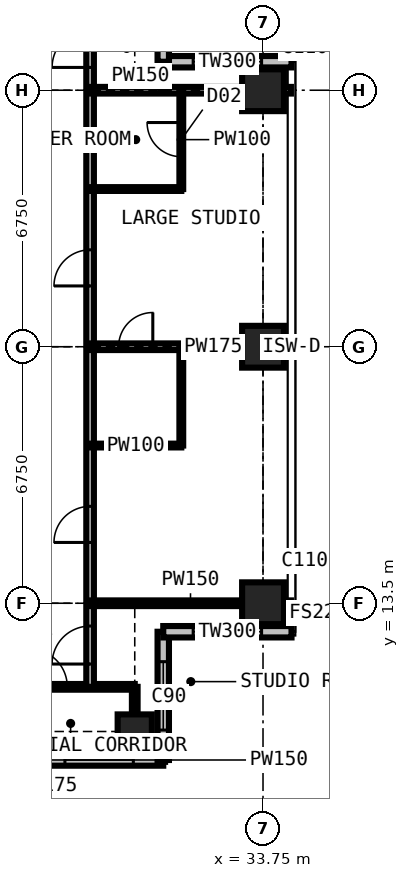
"""IFC4 building model, lengths in metres.
Left out: names, types, materials, properties, quantities, classifications, styles, units other than length and angle.
Written with IfcOpenShell. Run it as: python <this file> out.ifc"""

import sys

from ifc_helpers import new_model, si_unit, direction, frame, frame_2d, origin, origin_2d, place, context, subcontext, project, spatial, rectangle, extrude, element, fill, save


model = new_model("IFC4")
c1 = context("Model", 3, precision=1e-05, world=origin(), true_north=direction((0.0, 1.0)))
c2 = subcontext(c1, "Body", "Model", "MODEL_VIEW")
j1 = project(units=[si_unit("LENGTHUNIT", "METRE"), si_unit("PLANEANGLEUNIT", "RADIAN")], contexts=[c1])
p1 = place(None, origin())
s1 = spatial("IfcSite", under=j1, at=p1, CompositionType="ELEMENT")
p2 = place(p1, origin())
s2 = spatial("IfcBuilding", under=s1, at=p2, CompositionType="ELEMENT")
p3 = place(p2, frame((0.0, 0.0, 222.3)))
s3 = spatial("IfcBuildingStorey", under=s2, at=p3, CompositionType="ELEMENT", Elevation=222.3)
p4 = place(p3, frame((30.375, 10.125, 0.0), z_axis=(0.0, 0.0, 1.0), x_axis=(1.0, 0.0, 0.0)))
e1 = element("IfcColumn", 1, at=p4, inside=s3, PredefinedType="COLUMN", context=c2, shape_type="SweptSolid", body=[
    extrude(rectangle(XDim=0.9, YDim=0.9, at=origin_2d()), origin(), (0.0, 0.0, 1.0), 3.6),
])
for number, where, z_axis, x_axis in (
    (2, (33.75, 13.5, 0.0), (0.0, 0.0, 1.0), (1.0, 0.0, 0.0)),
    (3, (33.75, 20.25, 0.0), (0.0, 0.0, 1.0), (1.0, 0.0, 0.0)),
    (4, (33.75, 27.0, 0.0), (0.0, 0.0, 1.0), (1.0, 0.0, 0.0)),
):
    element("IfcColumn", number, at=place(p3, frame(where, z_axis=z_axis, x_axis=x_axis)), inside=s3, PredefinedType="COLUMN", context=c2, shape_type="SweptSolid", body=[
        extrude(rectangle(XDim=1.1, YDim=1.1, at=origin_2d()), origin(), (0.0, 0.0, 1.0), 3.6),
    ])
p5 = place(p3, frame((34.5, 27.75, 0.0), z_axis=(0.0, 0.0, 1.0), x_axis=(-1.0, 0.0, 0.0)))
e5 = element("IfcWall", 5, at=p5, inside=s3, PredefinedType="SOLIDWALL", context=c2, shape_type="SweptSolid", body=[
    extrude(rectangle(XDim=3.375, YDim=0.3, at=frame_2d((1.688, 0.0))), origin(), (0.0, 0.0, 1.0), 3.375),
])
p6 = place(p5, frame((0.788, 0.0, 0.6)))
e6 = element("IfcOpeningElement", 6, at=p6, cuts=e5, PredefinedType="OPENING", context=c2, shape_type="SweptSolid", body=[
    extrude(rectangle(XDim=1.8, YDim=2.1, at=frame_2d((0.9, 1.05))), frame((0.0, 0.16, 0.0), z_axis=(0.0, -1.0, 0.0), x_axis=(1.0, 0.0, 0.0)), (0.0, 0.0, 1.0), 0.32),
])
p7 = place(p3, frame((31.125, 27.75, 0.0), z_axis=(0.0, 0.0, 1.0), x_axis=(0.0, 1.0, 0.0)))
e7 = element("IfcWall", 7, at=p7, inside=s3, PredefinedType="SOLIDWALL", context=c2, shape_type="SweptSolid", body=[
    extrude(rectangle(XDim=3.375, YDim=0.3, at=frame_2d((1.688, 0.0))), origin(), (0.0, 0.0, 1.0), 3.375),
])
p8 = place(p7, frame((1.663, 0.0, 0.9)))
e8 = element("IfcOpeningElement", 8, at=p8, cuts=e7, PredefinedType="OPENING", context=c2, shape_type="SweptSolid", body=[
    extrude(rectangle(XDim=1.5, YDim=1.8, at=frame_2d((0.75, 0.9))), frame((0.0, 0.16, 0.0), z_axis=(0.0, -1.0, 0.0), x_axis=(1.0, 0.0, 0.0)), (0.0, 0.0, 1.0), 0.32),
])
p9 = place(p3, frame((27.75, 9.375, 0.0), z_axis=(0.0, 0.0, 1.0), x_axis=(1.0, 0.0, 0.0)))
e9 = element("IfcWall", 9, at=p9, inside=s3, PredefinedType="SOLIDWALL", context=c2, shape_type="SweptSolid", body=[
    extrude(rectangle(XDim=3.375, YDim=0.3, at=frame_2d((1.688, 0.0))), origin(), (0.0, 0.0, 1.0), 3.375),
])
p10 = place(p9, frame((0.788, 0.0, 0.6)))
e10 = element("IfcOpeningElement", 10, at=p10, cuts=e9, PredefinedType="OPENING", context=c2, shape_type="SweptSolid", body=[
    extrude(rectangle(XDim=1.8, YDim=2.1, at=frame_2d((0.9, 1.05))), frame((0.0, 0.16, 0.0), z_axis=(0.0, -1.0, 0.0), x_axis=(1.0, 0.0, 0.0)), (0.0, 0.0, 1.0), 0.32),
])
p11 = place(p3, frame((31.125, 9.375, 0.0), z_axis=(0.0, 0.0, 1.0), x_axis=(0.0, 1.0, 0.0)))
e11 = element("IfcWall", 11, at=p11, inside=s3, PredefinedType="SOLIDWALL", context=c2, shape_type="SweptSolid", body=[
    extrude(rectangle(XDim=3.375, YDim=0.3, at=frame_2d((1.688, 0.0))), origin(), (0.0, 0.0, 1.0), 3.375),
])
p12 = place(p11, frame((0.788, 0.0, 0.6)))
e12 = element("IfcOpeningElement", 12, at=p12, cuts=e11, PredefinedType="OPENING", context=c2, shape_type="SweptSolid", body=[
    extrude(rectangle(XDim=1.8, YDim=2.1, at=frame_2d((0.9, 1.05))), frame((0.0, 0.16, 0.0), z_axis=(0.0, -1.0, 0.0), x_axis=(1.0, 0.0, 0.0)), (0.0, 0.0, 1.0), 0.32),
])
p13 = place(p3, frame((31.125, 12.75, 0.0), z_axis=(0.0, 0.0, 1.0), x_axis=(1.0, 0.0, 0.0)))
e13 = element("IfcWall", 13, at=p13, inside=s3, PredefinedType="SOLIDWALL", context=c2, shape_type="SweptSolid", body=[
    extrude(rectangle(XDim=3.375, YDim=0.3, at=frame_2d((1.688, 0.0))), origin(), (0.0, 0.0, 1.0), 3.375),
])
p14 = place(p13, frame((0.788, 0.0, 0.6)))
e14 = element("IfcOpeningElement", 14, at=p14, cuts=e13, PredefinedType="OPENING", context=c2, shape_type="SweptSolid", body=[
    extrude(rectangle(XDim=1.8, YDim=2.1, at=frame_2d((0.9, 1.05))), frame((0.0, 0.16, 0.0), z_axis=(0.0, -1.0, 0.0), x_axis=(1.0, 0.0, 0.0)), (0.0, 0.0, 1.0), 0.32),
])
p15 = place(p3, frame((27.0, 11.3, 0.0), z_axis=(0.0, 0.0, 1.0), x_axis=(1.0, 0.0, 0.0)))
e15 = element("IfcWall", 15, at=p15, inside=s3, PredefinedType="PARTITIONING", context=c2, shape_type="SweptSolid", body=[
    extrude(rectangle(XDim=3.375, YDim=0.15, at=frame_2d((1.688, 0.0))), origin(), (0.0, 0.0, 1.0), 3.375),
])
p16 = place(p15, frame((0.6, 0.0, 0.0)))
e16 = element("IfcOpeningElement", 16, at=p16, cuts=e15, PredefinedType="OPENING", context=c2, shape_type="SweptSolid", body=[
    extrude(rectangle(XDim=1.0, YDim=2.2, at=frame_2d((0.5, 1.1))), frame((0.0, 0.085, 0.0), z_axis=(0.0, -1.0, 0.0), x_axis=(1.0, 0.0, 0.0)), (0.0, 0.0, 1.0), 0.17),
])
p17 = place(p3, frame((29.2, 11.3, 0.0), z_axis=(0.0, 0.0, 1.0), x_axis=(0.0, 1.0, 0.0)))
e17 = element("IfcWall", 17, at=p17, inside=s3, PredefinedType="PARTITIONING", context=c2, shape_type="SweptSolid", body=[
    extrude(rectangle(XDim=17.9, YDim=0.2, at=frame_2d((8.95, 0.0))), origin(), (0.0, 0.0, 1.0), 3.375),
])
p18 = place(p17, frame((0.6, 0.0, 0.0)))
e18 = element("IfcOpeningElement", 18, at=p18, cuts=e17, PredefinedType="OPENING", context=c2, shape_type="SweptSolid", body=[
    extrude(rectangle(XDim=1.0, YDim=2.2, at=frame_2d((0.5, 1.1))), frame((0.0, 0.11, 0.0), z_axis=(0.0, -1.0, 0.0), x_axis=(1.0, 0.0, 0.0)), (0.0, 0.0, 1.0), 0.22),
])
p19 = place(p17, frame((10.55, 0.0, 0.0)))
e19 = element("IfcOpeningElement", 19, at=p19, cuts=e17, PredefinedType="OPENING", context=c2, shape_type="SweptSolid", body=[
    extrude(rectangle(XDim=0.95, YDim=2.2, at=frame_2d((0.475, 1.1))), frame((0.0, 0.11, 0.0), z_axis=(0.0, -1.0, 0.0), x_axis=(1.0, 0.0, 0.0)), (0.0, 0.0, 1.0), 0.22),
])
p20 = place(p17, frame((3.8, 0.0, 0.0)))
e20 = element("IfcOpeningElement", 20, at=p20, cuts=e17, PredefinedType="OPENING", context=c2, shape_type="SweptSolid", body=[
    extrude(rectangle(XDim=0.95, YDim=2.2, at=frame_2d((0.475, 1.1))), frame((0.0, 0.11, 0.0), z_axis=(0.0, -1.0, 0.0), x_axis=(1.0, 0.0, 0.0)), (0.0, 0.0, 1.0), 0.22),
])
p21 = place(p17, frame((16.3, 0.0, 0.0)))
e21 = element("IfcOpeningElement", 21, at=p21, cuts=e17, PredefinedType="OPENING", context=c2, shape_type="SweptSolid", body=[
    extrude(rectangle(XDim=1.0, YDim=2.2, at=frame_2d((0.5, 1.1))), frame((0.0, 0.11, 0.0), z_axis=(0.0, -1.0, 0.0), x_axis=(1.0, 0.0, 0.0)), (0.0, 0.0, 1.0), 0.22),
])
p22 = place(p3, frame((29.2, 13.5, 0.0), z_axis=(0.0, 0.0, 1.0), x_axis=(1.0, 0.0, 0.0)))
e22 = element("IfcWall", 22, at=p22, inside=s3, PredefinedType="PARTITIONING", context=c2, shape_type="SweptSolid", body=[
    extrude(rectangle(XDim=5.284, YDim=0.15, at=frame_2d((2.642, 0.0))), origin(), (0.0, 0.0, 1.0), 2.877),
])
p23 = place(p3, frame((29.2, 17.65, 0.0), z_axis=(0.0, 0.0, 1.0), x_axis=(1.0, 0.0, 0.0)))
e23 = element("IfcWall", 23, at=p23, inside=s3, PredefinedType="PARTITIONING", context=c2, shape_type="SweptSolid", body=[
    extrude(rectangle(XDim=2.4, YDim=0.1, at=frame_2d((1.2, 0.0))), origin(), (0.0, 0.0, 1.0), 3.375),
])
p24 = place(p3, frame((29.2, 20.25, 0.0), z_axis=(0.0, 0.0, 1.0), x_axis=(1.0, 0.0, 0.0)))
e24 = element("IfcWall", 24, at=p24, inside=s3, PredefinedType="PARTITIONING", context=c2, shape_type="SweptSolid", body=[
    extrude(rectangle(XDim=5.284, YDim=0.175, at=frame_2d((2.642, 0.0))), origin(), (0.0, 0.0, 1.0), 2.877),
])
p25 = place(p24, frame((0.75, 0.0, 0.0)))
e25 = element("IfcOpeningElement", 25, at=p25, cuts=e24, PredefinedType="OPENING", context=c2, shape_type="SweptSolid", body=[
    extrude(rectangle(XDim=0.9, YDim=2.2, at=frame_2d((0.45, 1.1))), frame((0.0, 0.097, 0.0), z_axis=(0.0, -1.0, 0.0), x_axis=(1.0, 0.0, 0.0)), (0.0, 0.0, 1.0), 0.195),
])
p26 = place(p3, frame((29.2, 24.4, 0.0), z_axis=(0.0, 0.0, 1.0), x_axis=(1.0, 0.0, 0.0)))
e26 = element("IfcWall", 26, at=p26, inside=s3, PredefinedType="PARTITIONING", context=c2, shape_type="SweptSolid", body=[
    extrude(rectangle(XDim=2.4, YDim=0.1, at=frame_2d((1.2, 0.0))), origin(), (0.0, 0.0, 1.0), 3.375),
])
p27 = place(p3, frame((29.2, 27.0, 0.0), z_axis=(0.0, 0.0, 1.0), x_axis=(1.0, 0.0, 0.0)))
e27 = element("IfcWall", 27, at=p27, inside=s3, PredefinedType="PARTITIONING", context=c2, shape_type="SweptSolid", body=[
    extrude(rectangle(XDim=5.284, YDim=0.175, at=frame_2d((2.642, 0.0))), origin(), (0.0, 0.0, 1.0), 2.877),
])
p28 = place(p3, frame((30.375, 9.525, 0.0), z_axis=(0.0, 0.0, 1.0), x_axis=(0.0, 1.0, 0.0)))
e28 = element("IfcWall", 28, at=p28, inside=s3, PredefinedType="PARTITIONING", context=c2, shape_type="SweptSolid", body=[
    extrude(rectangle(XDim=1.775, YDim=0.15, at=frame_2d((0.888, 0.0))), origin(), (0.0, 0.0, 1.0), 2.877),
])
p29 = place(p3, frame((31.125, 27.0, 0.0), z_axis=(0.0, 0.0, 1.0), x_axis=(0.0, 1.0, 0.0)))
e29 = element("IfcWall", 29, at=p29, inside=s3, PredefinedType="PARTITIONING", context=c2, shape_type="SweptSolid", body=[
    extrude(rectangle(XDim=0.734, YDim=0.15, at=frame_2d((0.367, 0.0))), origin(), (0.0, 0.0, 1.0), 3.375),
])
p30 = place(p3, frame((31.6, 17.65, 0.0), z_axis=(0.0, 0.0, 1.0), x_axis=(0.0, 1.0, 0.0)))
e30 = element("IfcWall", 30, at=p30, inside=s3, PredefinedType="PARTITIONING", context=c2, shape_type="SweptSolid", body=[
    extrude(rectangle(XDim=2.6, YDim=0.1, at=frame_2d((1.3, 0.0))), origin(), (0.0, 0.0, 1.0), 3.375),
])
p31 = place(p3, frame((31.6, 24.4, 0.0), z_axis=(0.0, 0.0, 1.0), x_axis=(0.0, 1.0, 0.0)))
e31 = element("IfcWall", 31, at=p31, inside=s3, PredefinedType="PARTITIONING", context=c2, shape_type="SweptSolid", body=[
    extrude(rectangle(XDim=2.6, YDim=0.1, at=frame_2d((1.3, 0.0))), origin(), (0.0, 0.0, 1.0), 3.375),
])
p32 = place(p31, frame((0.85, 0.0, 0.0)))
e32 = element("IfcOpeningElement", 32, at=p32, cuts=e31, PredefinedType="OPENING", context=c2, shape_type="SweptSolid", body=[
    extrude(rectangle(XDim=0.9, YDim=2.2, at=frame_2d((0.45, 1.1))), frame((0.0, 0.06, 0.0), z_axis=(0.0, -1.0, 0.0), x_axis=(1.0, 0.0, 0.0)), (0.0, 0.0, 1.0), 0.12),
])
p33 = place(p6, origin())
e33 = element("IfcWindow", 33, at=p33, inside=s3, PartitioningType="SINGLE_PANEL", PredefinedType="WINDOW", context=c2, shape_type="SweptSolid", body=[
    extrude(rectangle(XDim=1.8, YDim=2.1, at=frame_2d((0.9, 1.05))), frame((0.0, 0.03, 0.0), z_axis=(0.0, -1.0, 0.0), x_axis=(1.0, 0.0, 0.0)), (0.0, 0.0, 1.0), 0.06),
])
fill(e6, e33)
p34 = place(p10, origin())
e34 = element("IfcWindow", 34, at=p34, inside=s3, PartitioningType="SINGLE_PANEL", PredefinedType="WINDOW", context=c2, shape_type="SweptSolid", body=[
    extrude(rectangle(XDim=1.8, YDim=2.1, at=frame_2d((0.9, 1.05))), frame((0.0, 0.03, 0.0), z_axis=(0.0, -1.0, 0.0), x_axis=(1.0, 0.0, 0.0)), (0.0, 0.0, 1.0), 0.06),
])
fill(e10, e34)
p35 = place(p12, origin())
e35 = element("IfcWindow", 35, at=p35, inside=s3, PartitioningType="SINGLE_PANEL", PredefinedType="WINDOW", context=c2, shape_type="SweptSolid", body=[
    extrude(rectangle(XDim=1.8, YDim=2.1, at=frame_2d((0.9, 1.05))), frame((0.0, 0.03, 0.0), z_axis=(0.0, -1.0, 0.0), x_axis=(1.0, 0.0, 0.0)), (0.0, 0.0, 1.0), 0.06),
])
fill(e12, e35)
p36 = place(p14, origin())
e36 = element("IfcWindow", 36, at=p36, inside=s3, PartitioningType="SINGLE_PANEL", PredefinedType="WINDOW", context=c2, shape_type="SweptSolid", body=[
    extrude(rectangle(XDim=1.8, YDim=2.1, at=frame_2d((0.9, 1.05))), frame((0.0, 0.03, 0.0), z_axis=(0.0, -1.0, 0.0), x_axis=(1.0, 0.0, 0.0)), (0.0, 0.0, 1.0), 0.06),
])
fill(e14, e36)
p37 = place(p16, origin())
e37 = element("IfcDoor", 37, at=p37, inside=s3, OperationType="SINGLE_SWING_LEFT", PredefinedType="DOOR", context=c2, shape_type="SweptSolid", body=[
    extrude(rectangle(XDim=1.0, YDim=2.2, at=frame_2d((0.5, 1.1))), frame((0.0, 0.025, 0.0), z_axis=(0.0, -1.0, 0.0), x_axis=(1.0, 0.0, 0.0)), (0.0, 0.0, 1.0), 0.05),
])
fill(e16, e37)
p38 = place(p18, origin())
e38 = element("IfcDoor", 38, at=p38, inside=s3, OperationType="SINGLE_SWING_LEFT", PredefinedType="DOOR", context=c2, shape_type="SweptSolid", body=[
    extrude(rectangle(XDim=1.0, YDim=2.2, at=frame_2d((0.5, 1.1))), frame((0.0, 0.025, 0.0), z_axis=(0.0, -1.0, 0.0), x_axis=(1.0, 0.0, 0.0)), (0.0, 0.0, 1.0), 0.05),
])
fill(e18, e38)
p39 = place(p19, origin())
e39 = element("IfcDoor", 39, at=p39, inside=s3, OperationType="SINGLE_SWING_LEFT", PredefinedType="DOOR", context=c2, shape_type="SweptSolid", body=[
    extrude(rectangle(XDim=0.95, YDim=2.2, at=frame_2d((0.475, 1.1))), frame((0.0, 0.025, 0.0), z_axis=(0.0, -1.0, 0.0), x_axis=(1.0, 0.0, 0.0)), (0.0, 0.0, 1.0), 0.05),
])
fill(e19, e39)
p40 = place(p32, origin())
e40 = element("IfcDoor", 40, at=p40, inside=s3, OperationType="SINGLE_SWING_RIGHT", PredefinedType="DOOR", context=c2, shape_type="SweptSolid", body=[
    extrude(rectangle(XDim=0.9, YDim=2.2, at=frame_2d((0.45, 1.1))), frame((0.0, 0.025, 0.0), z_axis=(0.0, -1.0, 0.0), x_axis=(1.0, 0.0, 0.0)), (0.0, 0.0, 1.0), 0.05),
])
fill(e32, e40)
p41 = place(p20, origin())
e41 = element("IfcDoor", 41, at=p41, inside=s3, OperationType="SINGLE_SWING_LEFT", PredefinedType="DOOR", context=c2, shape_type="SweptSolid", body=[
    extrude(rectangle(XDim=0.95, YDim=2.2, at=frame_2d((0.475, 1.1))), frame((0.0, 0.025, 0.0), z_axis=(0.0, -1.0, 0.0), x_axis=(1.0, 0.0, 0.0)), (0.0, 0.0, 1.0), 0.05),
])
fill(e20, e41)
p42 = place(p25, origin())
e42 = element("IfcDoor", 42, at=p42, inside=s3, OperationType="SINGLE_SWING_RIGHT", PredefinedType="DOOR", context=c2, shape_type="SweptSolid", body=[
    extrude(rectangle(XDim=0.9, YDim=2.2, at=frame_2d((0.45, 1.1))), frame((0.0, 0.025, 0.0), z_axis=(0.0, -1.0, 0.0), x_axis=(1.0, 0.0, 0.0)), (0.0, 0.0, 1.0), 0.05),
])
fill(e25, e42)
p43 = place(p21, origin())
e43 = element("IfcDoor", 43, at=p43, inside=s3, OperationType="SINGLE_SWING_LEFT", PredefinedType="DOOR", context=c2, shape_type="SweptSolid", body=[
    extrude(rectangle(XDim=1.0, YDim=2.2, at=frame_2d((0.5, 1.1))), frame((0.0, 0.025, 0.0), z_axis=(0.0, -1.0, 0.0), x_axis=(1.0, 0.0, 0.0)), (0.0, 0.0, 1.0), 0.05),
])
fill(e21, e43)
save(model, sys.argv[1])
